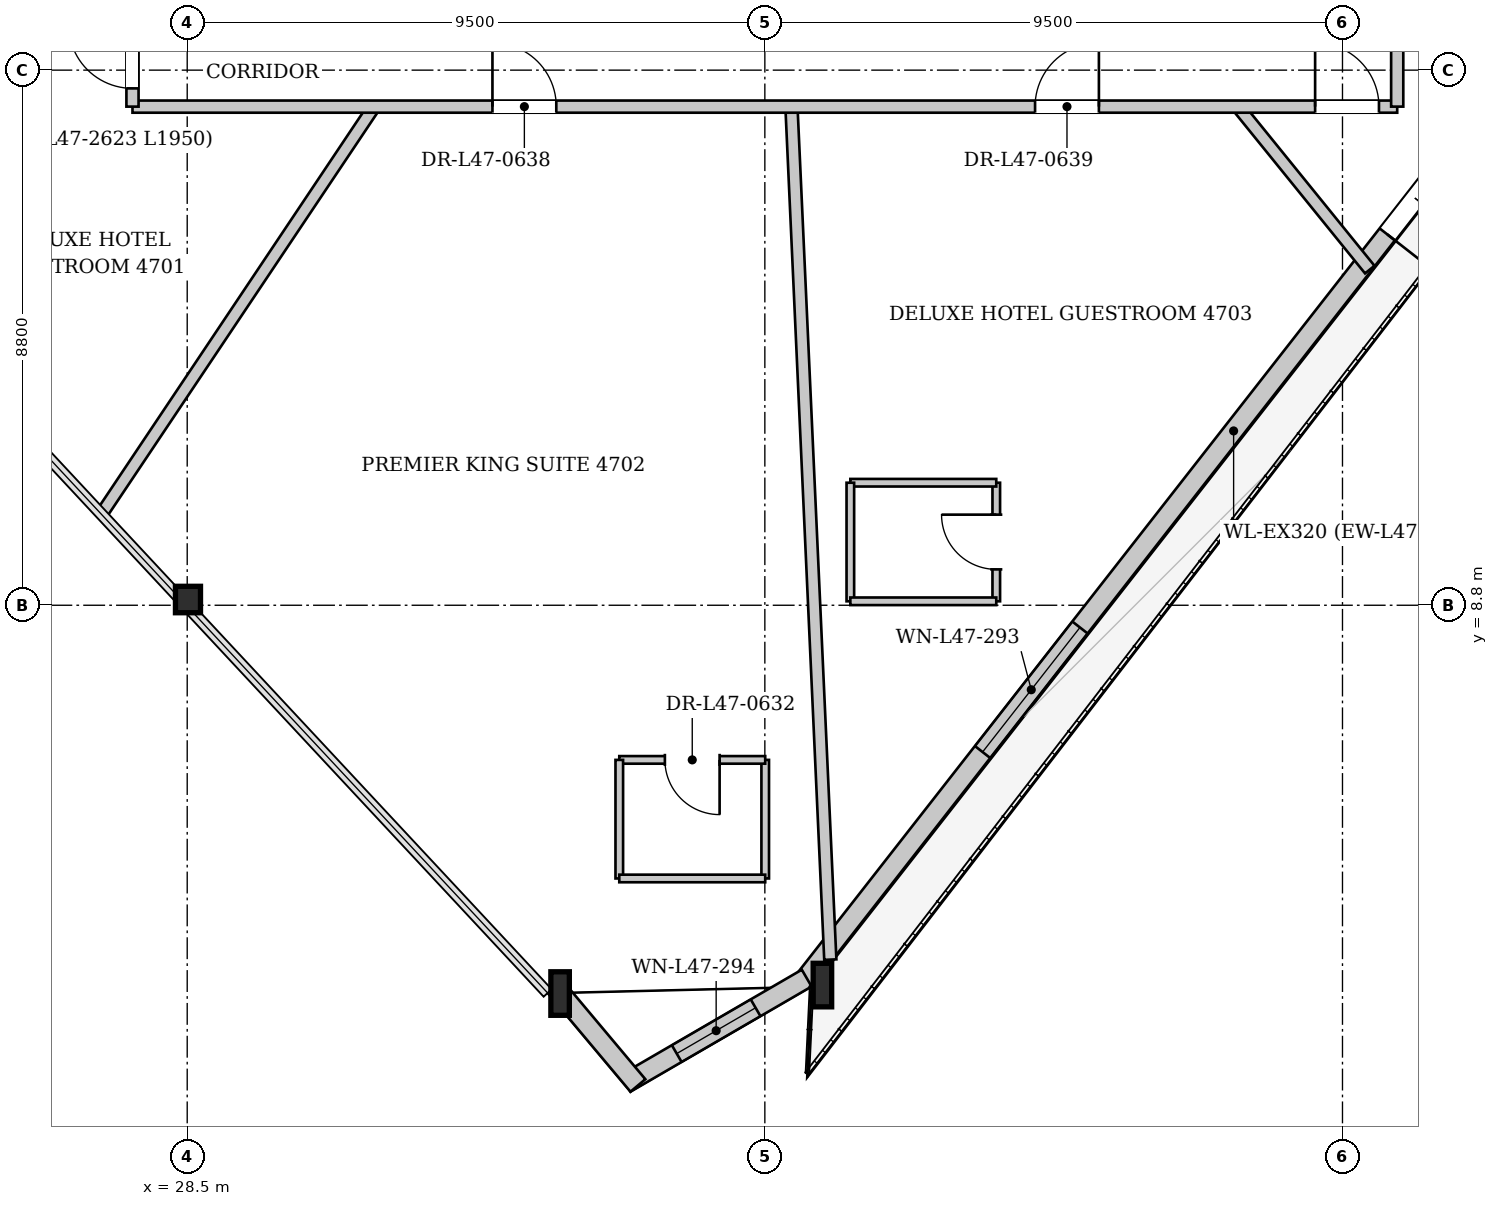
"""IFC4 building model, lengths in metres.
Left out: names, types, materials, properties, quantities, classifications, styles, units other than length and angle.
Written with IfcOpenShell. Run it as: python <this file> out.ifc"""

import sys

from ifc_helpers import new_model, si_unit, direction, frame, frame_2d, origin, origin_2d, place, context, subcontext, project, spatial, rectangle, i_section, extrude, source, transform, mapped, element, fill, save


model = new_model("IFC4")
c1 = context("Model", 3, precision=1e-05, world=origin(), true_north=direction((0.0, 1.0)))
c2 = subcontext(c1, "Body", "Model", "MODEL_VIEW")
j1 = project(units=[si_unit("LENGTHUNIT", "METRE"), si_unit("PLANEANGLEUNIT", "RADIAN")], contexts=[c1])
p1 = place(None, origin())
s1 = spatial("IfcSite", under=j1, at=p1, CompositionType="ELEMENT")
p2 = place(p1, origin())
s2 = spatial("IfcBuilding", under=s1, at=p2, CompositionType="ELEMENT")
p3 = place(p2, frame((0.0, 0.0, 178.55)))
s3 = spatial("IfcBuildingStorey", under=s2, at=p3, CompositionType="ELEMENT", Elevation=178.55)
m1 = source(origin(), c2, "Body", "SweptSolid", [
    extrude(i_section(OverallWidth=0.412, OverallDepth=0.435, WebThickness=0.031, FlangeThickness=0.05, at=origin_2d()), origin(), (0.0, 0.0, 1.0), 3.403),
])
p4 = place(p3, frame((28.347, 8.947, 0.0), z_axis=(0.097502901597, -0.030779061652, 0.994759183694), x_axis=(0.301030617956, 0.953614475065, 0.0)))
e1 = element("IfcColumn", 1, at=p4, inside=s3, PredefinedType="COLUMN", context=c2, shape_type="MappedRepresentation", body=[
    mapped(m1, transform((0.0, 0.0, 0.0), x_axis=(1.0, 0.0, 0.0), y_axis=(0.0, 1.0, 0.0), z_axis=(0.0, 0.0, 1.0), scale=1.0)),
])
m2 = source(origin(), c2, "Body", "SweptSolid", [
    extrude(i_section(OverallWidth=0.304, OverallDepth=0.716, WebThickness=0.021, FlangeThickness=0.04, at=origin_2d()), origin(), (0.0, 0.0, 1.0), 3.41),
])
p5 = place(p3, frame((34.428, 2.424, 0.0), z_axis=(0.120145690359, -0.005441640326, 0.992741356869), x_axis=(0.045245630392, 0.998975892067, 0.0)))
e2 = element("IfcColumn", 2, at=p5, inside=s3, PredefinedType="COLUMN", context=c2, shape_type="MappedRepresentation", body=[
    mapped(m2, transform((0.0, 0.0, 0.0), x_axis=(1.0, 0.0, 0.0), y_axis=(0.0, 1.0, 0.0), z_axis=(0.0, 0.0, 1.0), scale=1.0)),
])
m3 = source(origin(), c2, "Body", "SweptSolid", [
    extrude(i_section(OverallWidth=0.304, OverallDepth=0.716, WebThickness=0.021, FlangeThickness=0.04, at=origin_2d()), origin(), (0.0, 0.0, 1.0), 3.404),
])
p6 = place(p3, frame((38.769, 2.53, 0.0), z_axis=(0.104640945149, 0.013985595822, 0.994411723436), x_axis=(-0.132475210533, 0.991186318809, 0.0)))
e3 = element("IfcColumn", 3, at=p6, inside=s3, PredefinedType="COLUMN", context=c2, shape_type="MappedRepresentation", body=[
    mapped(m3, transform((0.0, 0.0, 0.0), x_axis=(1.0, 0.0, 0.0), y_axis=(0.0, 1.0, 0.0), z_axis=(0.0, 0.0, 1.0), scale=1.0)),
])
p7 = place(p3, frame((53.023, 21.021, 0.0), z_axis=(0.0, 0.0, 1.0), x_axis=(-0.61594757216, -0.787787146601, 0.0)))
e4 = element("IfcWall", 4, at=p7, inside=s3, PredefinedType="SOLIDWALL", context=c2, shape_type="SweptSolid", body=[
    extrude(rectangle(XDim=23.347, YDim=0.32, at=frame_2d((11.674, 0.0))), origin(), (0.0, 0.0, 1.0), 2.722),
])
p8 = place(p7, frame((6.271, 0.0, 0.0)))
e5 = element("IfcOpeningElement", 5, at=p8, cuts=e4, PredefinedType="OPENING", context=c2, shape_type="SweptSolid", body=[
    extrude(rectangle(XDim=1.5, YDim=2.3, at=frame_2d((0.75, 1.15))), frame((0.0, 0.17, 0.0), z_axis=(0.0, -1.0, 0.0), x_axis=(1.0, 0.0, 0.0)), (0.0, 0.0, 1.0), 0.34),
])
p9 = place(p7, frame((15.977, 0.0, 0.252)))
e6 = element("IfcOpeningElement", 6, at=p9, cuts=e4, PredefinedType="OPENING", context=c2, shape_type="SweptSolid", body=[
    extrude(rectangle(XDim=2.6, YDim=2.35, at=frame_2d((1.3, 1.175))), frame((0.0, 0.17, 0.0), z_axis=(0.0, -1.0, 0.0), x_axis=(1.0, 0.0, 0.0)), (0.0, 0.0, 1.0), 0.34),
])
p10 = place(p3, frame((38.688, 2.668, 0.0), z_axis=(0.0, 0.0, 1.0), x_axis=(-0.864772067984, -0.502164585007, 0.0)))
e7 = element("IfcWall", 7, at=p10, inside=s3, PredefinedType="SOLIDWALL", context=c2, shape_type="SweptSolid", body=[
    extrude(rectangle(XDim=3.445, YDim=0.32, at=frame_2d((1.722, 0.0))), origin(), (0.0, 0.0, 1.0), 2.722),
])
p11 = place(p10, frame((0.972, 0.0, 0.302)))
e8 = element("IfcOpeningElement", 8, at=p11, cuts=e7, PredefinedType="OPENING", context=c2, shape_type="SweptSolid", body=[
    extrude(rectangle(XDim=1.5, YDim=2.3, at=frame_2d((0.75, 1.15))), frame((0.0, 0.17, 0.0), z_axis=(0.0, -1.0, 0.0), x_axis=(1.0, 0.0, 0.0)), (0.0, 0.0, 1.0), 0.34),
])
p12 = place(p3, frame((35.913, 0.903, 0.0), z_axis=(0.0, 0.0, 1.0), x_axis=(-0.642730042418, 0.766092744107, 0.0)))
e9 = element("IfcWall", 9, at=p12, inside=s3, PredefinedType="SOLIDWALL", context=c2, shape_type="SweptSolid", body=[
    extrude(rectangle(XDim=2.12, YDim=0.32, at=frame_2d((1.06, 0.0))), origin(), (0.0, 0.0, 1.0), 2.722),
])
p13 = place(p3, frame((31.574, 17.0, 0.0), z_axis=(0.0, 0.0, 1.0), x_axis=(-0.556234798173, -0.831025179704, 0.0)))
e10 = element("IfcWall", 10, at=p13, inside=s3, PredefinedType="PARTITIONING", context=c2, shape_type="SweptSolid", body=[
    extrude(rectangle(XDim=8.035, YDim=0.2, at=frame_2d((4.018, 0.0))), origin(), (0.0, 0.0, 1.0), 3.33),
])
p14 = place(p3, frame((38.438, 17.0, 0.0), z_axis=(0.0, 0.0, 1.0), x_axis=(0.045517283836, -0.998963551323, 0.0)))
e11 = element("IfcWall", 11, at=p14, inside=s3, PredefinedType="PARTITIONING", context=c2, shape_type="SweptSolid", body=[
    extrude(rectangle(XDim=14.042, YDim=0.2, at=frame_2d((7.021, 0.0))), origin(), (0.0, 0.0, 1.0), 3.005),
])
p15 = place(p3, frame((45.778, 17.0, 0.0), z_axis=(0.0, 0.0, 1.0), x_axis=(0.629534141466, -0.776972821101, 0.0)))
e12 = element("IfcWall", 12, at=p15, inside=s3, PredefinedType="PARTITIONING", context=c2, shape_type="SweptSolid", body=[
    extrude(rectangle(XDim=3.449, YDim=0.2, at=frame_2d((1.725, 0.0))), origin(), (0.0, 0.0, 1.0), 3.33),
])
p16 = place(p3, frame((38.006, 4.307, 0.0), z_axis=(0.0, 0.0, 1.0), x_axis=(0.0, 1.0, 0.0)))
e13 = element("IfcWall", 13, at=p16, inside=s3, PredefinedType="PARTITIONING", context=c2, shape_type="SweptSolid", body=[
    extrude(rectangle(XDim=1.95, YDim=0.125, at=frame_2d((0.975, 0.0))), origin(), (0.0, 0.0, 1.0), 3.33),
])
p17 = place(p3, frame((38.006, 6.257, 0.0), z_axis=(0.0, 0.0, 1.0), x_axis=(-1.0, 0.0, 0.0)))
e14 = element("IfcWall", 14, at=p17, inside=s3, PredefinedType="PARTITIONING", context=c2, shape_type="SweptSolid", body=[
    extrude(rectangle(XDim=2.4, YDim=0.125, at=frame_2d((1.2, 0.0))), origin(), (0.0, 0.0, 1.0), 3.33),
])
p18 = place(p17, frame((0.75, 0.0, 0.0)))
e15 = element("IfcOpeningElement", 15, at=p18, cuts=e14, PredefinedType="OPENING", context=c2, shape_type="SweptSolid", body=[
    extrude(rectangle(XDim=0.9, YDim=2.1, at=frame_2d((0.45, 1.05))), frame((0.0, 0.073, 0.0), z_axis=(0.0, -1.0, 0.0), x_axis=(1.0, 0.0, 0.0)), (0.0, 0.0, 1.0), 0.145),
])
p19 = place(p3, frame((35.606, 6.257, 0.0), z_axis=(0.0, 0.0, 1.0), x_axis=(0.0, -1.0, 0.0)))
e16 = element("IfcWall", 16, at=p19, inside=s3, PredefinedType="PARTITIONING", context=c2, shape_type="SweptSolid", body=[
    extrude(rectangle(XDim=1.95, YDim=0.125, at=frame_2d((0.975, 0.0))), origin(), (0.0, 0.0, 1.0), 3.33),
])
p20 = place(p3, frame((35.606, 4.307, 0.0), z_axis=(0.0, 0.0, 1.0), x_axis=(1.0, 0.0, 0.0)))
e17 = element("IfcWall", 17, at=p20, inside=s3, PredefinedType="PARTITIONING", context=c2, shape_type="SweptSolid", body=[
    extrude(rectangle(XDim=2.4, YDim=0.125, at=frame_2d((1.2, 0.0))), origin(), (0.0, 0.0, 1.0), 3.33),
])
p21 = place(p3, frame((41.806, 8.865, 0.0), z_axis=(0.0, 0.0, 1.0), x_axis=(0.0, 1.0, 0.0)))
e18 = element("IfcWall", 18, at=p21, inside=s3, PredefinedType="PARTITIONING", context=c2, shape_type="SweptSolid", body=[
    extrude(rectangle(XDim=1.95, YDim=0.125, at=frame_2d((0.975, 0.0))), origin(), (0.0, 0.0, 1.0), 3.33),
])
p22 = place(p21, frame((0.525, 0.0, 0.0)))
e19 = element("IfcOpeningElement", 19, at=p22, cuts=e18, PredefinedType="OPENING", context=c2, shape_type="SweptSolid", body=[
    extrude(rectangle(XDim=0.9, YDim=2.1, at=frame_2d((0.45, 1.05))), frame((0.0, 0.073, 0.0), z_axis=(0.0, -1.0, 0.0), x_axis=(1.0, 0.0, 0.0)), (0.0, 0.0, 1.0), 0.145),
])
p23 = place(p3, frame((41.806, 10.815, 0.0), z_axis=(0.0, 0.0, 1.0), x_axis=(-1.0, 0.0, 0.0)))
e20 = element("IfcWall", 20, at=p23, inside=s3, PredefinedType="PARTITIONING", context=c2, shape_type="SweptSolid", body=[
    extrude(rectangle(XDim=2.4, YDim=0.125, at=frame_2d((1.2, 0.0))), origin(), (0.0, 0.0, 1.0), 3.33),
])
p24 = place(p3, frame((39.406, 10.815, 0.0), z_axis=(0.0, 0.0, 1.0), x_axis=(0.0, -1.0, 0.0)))
e21 = element("IfcWall", 21, at=p24, inside=s3, PredefinedType="PARTITIONING", context=c2, shape_type="SweptSolid", body=[
    extrude(rectangle(XDim=1.95, YDim=0.125, at=frame_2d((0.975, 0.0))), origin(), (0.0, 0.0, 1.0), 3.33),
])
p25 = place(p3, frame((39.406, 8.865, 0.0), z_axis=(0.0, 0.0, 1.0), x_axis=(1.0, 0.0, 0.0)))
e22 = element("IfcWall", 22, at=p25, inside=s3, PredefinedType="PARTITIONING", context=c2, shape_type="SweptSolid", body=[
    extrude(rectangle(XDim=2.4, YDim=0.125, at=frame_2d((1.2, 0.0))), origin(), (0.0, 0.0, 1.0), 3.33),
])
p26 = place(p3, frame((27.6, 17.0, 0.0), z_axis=(0.0, 0.0, 1.0), x_axis=(1.0, 0.0, 0.0)))
e23 = element("IfcWall", 23, at=p26, inside=s3, PredefinedType="PARTITIONING", context=c2, shape_type="SweptSolid", body=[
    extrude(rectangle(XDim=20.8, YDim=0.2, at=frame_2d((10.4, 0.0))), origin(), (0.0, 0.0, 1.0), 3.33),
])
p27 = place(p26, frame((5.92, 0.0, 0.0)))
e24 = element("IfcOpeningElement", 24, at=p27, cuts=e23, PredefinedType="OPENING", context=c2, shape_type="SweptSolid", body=[
    extrude(rectangle(XDim=1.05, YDim=2.2, at=frame_2d((0.525, 1.1))), frame((0.0, 0.11, 0.0), z_axis=(0.0, -1.0, 0.0), x_axis=(1.0, 0.0, 0.0)), (0.0, 0.0, 1.0), 0.22),
])
p28 = place(p26, frame((14.844, 0.0, 0.0)))
e25 = element("IfcOpeningElement", 25, at=p28, cuts=e23, PredefinedType="OPENING", context=c2, shape_type="SweptSolid", body=[
    extrude(rectangle(XDim=1.05, YDim=2.2, at=frame_2d((0.525, 1.1))), frame((0.0, 0.11, 0.0), z_axis=(0.0, -1.0, 0.0), x_axis=(1.0, 0.0, 0.0)), (0.0, 0.0, 1.0), 0.22),
])
p29 = place(p26, frame((19.45, 0.0, 0.0)))
e26 = element("IfcOpeningElement", 26, at=p29, cuts=e23, PredefinedType="OPENING", context=c2, shape_type="SweptSolid", body=[
    extrude(rectangle(XDim=1.05, YDim=2.2, at=frame_2d((0.525, 1.1))), frame((0.0, 0.11, 0.0), z_axis=(0.0, -1.0, 0.0), x_axis=(1.0, 0.0, 0.0)), (0.0, 0.0, 1.0), 0.22),
])
p30 = place(p3, frame((27.6, 17.0, 0.0), z_axis=(0.0, 0.0, 1.0), x_axis=(0.0, 1.0, 0.0)))
e27 = element("IfcWall", 27, at=p30, inside=s3, PredefinedType="PARTITIONING", context=c2, shape_type="SweptSolid", body=[
    extrude(rectangle(XDim=19.2, YDim=0.2, at=frame_2d((9.6, 0.0))), origin(), (0.0, 0.0, 1.0), 3.33),
])
p31 = place(p30, frame((0.3, 0.0, 0.0)))
e28 = element("IfcOpeningElement", 28, at=p31, cuts=e27, PredefinedType="OPENING", context=c2, shape_type="SweptSolid", body=[
    extrude(rectangle(XDim=1.05, YDim=2.2, at=frame_2d((0.525, 1.1))), frame((0.0, 0.11, 0.0), z_axis=(0.0, -1.0, 0.0), x_axis=(1.0, 0.0, 0.0)), (0.0, 0.0, 1.0), 0.22),
])
p32 = place(p30, frame((17.85, 0.0, 0.0)))
e29 = element("IfcOpeningElement", 29, at=p32, cuts=e27, PredefinedType="OPENING", context=c2, shape_type="SweptSolid", body=[
    extrude(rectangle(XDim=1.05, YDim=2.2, at=frame_2d((0.525, 1.1))), frame((0.0, 0.11, 0.0), z_axis=(0.0, -1.0, 0.0), x_axis=(1.0, 0.0, 0.0)), (0.0, 0.0, 1.0), 0.22),
])
p33 = place(p30, frame((8.301, 0.0, 0.0)))
e30 = element("IfcOpeningElement", 30, at=p33, cuts=e27, PredefinedType="OPENING", context=c2, shape_type="SweptSolid", body=[
    extrude(rectangle(XDim=1.05, YDim=2.2, at=frame_2d((0.525, 1.1))), frame((0.0, 0.11, 0.0), z_axis=(0.0, -1.0, 0.0), x_axis=(1.0, 0.0, 0.0)), (0.0, 0.0, 1.0), 0.22),
])
p34 = place(p3, frame((48.4, 17.0, 0.0), z_axis=(0.0, 0.0, 1.0), x_axis=(0.0, 1.0, 0.0)))
e31 = element("IfcWall", 31, at=p34, inside=s3, PredefinedType="PARTITIONING", context=c2, shape_type="SweptSolid", body=[
    extrude(rectangle(XDim=19.2, YDim=0.2, at=frame_2d((9.6, 0.0))), origin(), (0.0, 0.0, 1.0), 3.33),
])
p35 = place(p34, frame((9.249, 0.0, 0.0)))
e32 = element("IfcOpeningElement", 32, at=p35, cuts=e31, PredefinedType="OPENING", context=c2, shape_type="SweptSolid", body=[
    extrude(rectangle(XDim=1.05, YDim=2.2, at=frame_2d((0.525, 1.1))), frame((0.0, 0.11, 0.0), z_axis=(0.0, -1.0, 0.0), x_axis=(1.0, 0.0, 0.0)), (0.0, 0.0, 1.0), 0.22),
])
m4 = source(origin(), c2, "Body", "SweptSolid", [
    extrude(rectangle(XDim=1.5, YDim=2.3, at=frame_2d((0.75, 1.15))), frame((0.0, 0.025, 0.0), z_axis=(0.0, -1.0, 0.0), x_axis=(1.0, 0.0, 0.0)), (0.0, 0.0, 1.0), 0.05),
])
p36 = place(p8, origin())
e33 = element("IfcDoor", 33, at=p36, inside=s3, OperationType="DOUBLE_DOOR_SINGLE_SWING", PredefinedType="DOOR", context=c2, shape_type="MappedRepresentation", body=[
    mapped(m4, transform((0.0, 0.0, 0.0), x_axis=(1.0, 0.0, 0.0), y_axis=(0.0, 1.0, 0.0), z_axis=(0.0, 0.0, 1.0), scale=1.0)),
])
fill(e5, e33)
m5 = source(origin(), c2, "Body", "SweptSolid", [
    extrude(rectangle(XDim=2.6, YDim=2.35, at=frame_2d((1.3, 1.175))), frame((0.0, 0.03, 0.0), z_axis=(0.0, -1.0, 0.0), x_axis=(1.0, 0.0, 0.0)), (0.0, 0.0, 1.0), 0.06),
])
p37 = place(p9, origin())
e34 = element("IfcWindow", 34, at=p37, inside=s3, PartitioningType="SINGLE_PANEL", PredefinedType="WINDOW", context=c2, shape_type="MappedRepresentation", body=[
    mapped(m5, transform((0.0, 0.0, 0.0), x_axis=(1.0, 0.0, 0.0), y_axis=(0.0, 1.0, 0.0), z_axis=(0.0, 0.0, 1.0), scale=1.0)),
])
fill(e6, e34)
m6 = source(origin(), c2, "Body", "SweptSolid", [
    extrude(rectangle(XDim=1.5, YDim=2.3, at=frame_2d((0.75, 1.15))), frame((0.0, 0.03, 0.0), z_axis=(0.0, -1.0, 0.0), x_axis=(1.0, 0.0, 0.0)), (0.0, 0.0, 1.0), 0.06),
])
p38 = place(p11, origin())
e35 = element("IfcWindow", 35, at=p38, inside=s3, PartitioningType="SINGLE_PANEL", PredefinedType="WINDOW", context=c2, shape_type="MappedRepresentation", body=[
    mapped(m6, transform((0.0, 0.0, 0.0), x_axis=(1.0, 0.0, 0.0), y_axis=(0.0, 1.0, 0.0), z_axis=(0.0, 0.0, 1.0), scale=1.0)),
])
fill(e8, e35)
m7 = source(origin(), c2, "Body", "SweptSolid", [
    extrude(rectangle(XDim=0.9, YDim=2.1, at=frame_2d((0.45, 1.05))), frame((0.0, 0.025, 0.0), z_axis=(0.0, -1.0, 0.0), x_axis=(1.0, 0.0, 0.0)), (0.0, 0.0, 1.0), 0.05),
])
p39 = place(p18, origin())
e36 = element("IfcDoor", 36, at=p39, inside=s3, OperationType="SINGLE_SWING_LEFT", PredefinedType="DOOR", context=c2, shape_type="MappedRepresentation", body=[
    mapped(m7, transform((0.0, 0.0, 0.0), x_axis=(1.0, 0.0, 0.0), y_axis=(0.0, 1.0, 0.0), z_axis=(0.0, 0.0, 1.0), scale=1.0)),
])
fill(e15, e36)
p40 = place(p22, origin())
e37 = element("IfcDoor", 37, at=p40, inside=s3, OperationType="SINGLE_SWING_RIGHT", PredefinedType="DOOR", context=c2, shape_type="MappedRepresentation", body=[
    mapped(m7, transform((0.0, 0.0, 0.0), x_axis=(1.0, 0.0, 0.0), y_axis=(0.0, 1.0, 0.0), z_axis=(0.0, 0.0, 1.0), scale=1.0)),
])
fill(e19, e37)
m8 = source(origin(), c2, "Body", "SweptSolid", [
    extrude(rectangle(XDim=1.05, YDim=2.2, at=frame_2d((0.525, 1.1))), frame((0.0, 0.025, 0.0), z_axis=(0.0, -1.0, 0.0), x_axis=(1.0, 0.0, 0.0)), (0.0, 0.0, 1.0), 0.05),
])
p41 = place(p27, origin())
e38 = element("IfcDoor", 38, at=p41, inside=s3, OperationType="SINGLE_SWING_LEFT", PredefinedType="DOOR", context=c2, shape_type="MappedRepresentation", body=[
    mapped(m8, transform((0.0, 0.0, 0.0), x_axis=(1.0, 0.0, 0.0), y_axis=(0.0, 1.0, 0.0), z_axis=(0.0, 0.0, 1.0), scale=1.0)),
])
fill(e24, e38)
p42 = place(p28, origin())
e39 = element("IfcDoor", 39, at=p42, inside=s3, OperationType="SINGLE_SWING_RIGHT", PredefinedType="DOOR", context=c2, shape_type="MappedRepresentation", body=[
    mapped(m8, transform((0.0, 0.0, 0.0), x_axis=(1.0, 0.0, 0.0), y_axis=(0.0, 1.0, 0.0), z_axis=(0.0, 0.0, 1.0), scale=1.0)),
])
fill(e25, e39)
p43 = place(p29, origin())
e40 = element("IfcDoor", 40, at=p43, inside=s3, OperationType="SINGLE_SWING_LEFT", PredefinedType="DOOR", context=c2, shape_type="MappedRepresentation", body=[
    mapped(m8, transform((0.0, 0.0, 0.0), x_axis=(1.0, 0.0, 0.0), y_axis=(0.0, 1.0, 0.0), z_axis=(0.0, 0.0, 1.0), scale=1.0)),
])
fill(e26, e40)
p44 = place(p31, origin())
e41 = element("IfcDoor", 41, at=p44, inside=s3, OperationType="SINGLE_SWING_RIGHT", PredefinedType="DOOR", context=c2, shape_type="MappedRepresentation", body=[
    mapped(m8, transform((0.0, 0.0, 0.0), x_axis=(1.0, 0.0, 0.0), y_axis=(0.0, 1.0, 0.0), z_axis=(0.0, 0.0, 1.0), scale=1.0)),
])
fill(e28, e41)
save(model, sys.argv[1])
